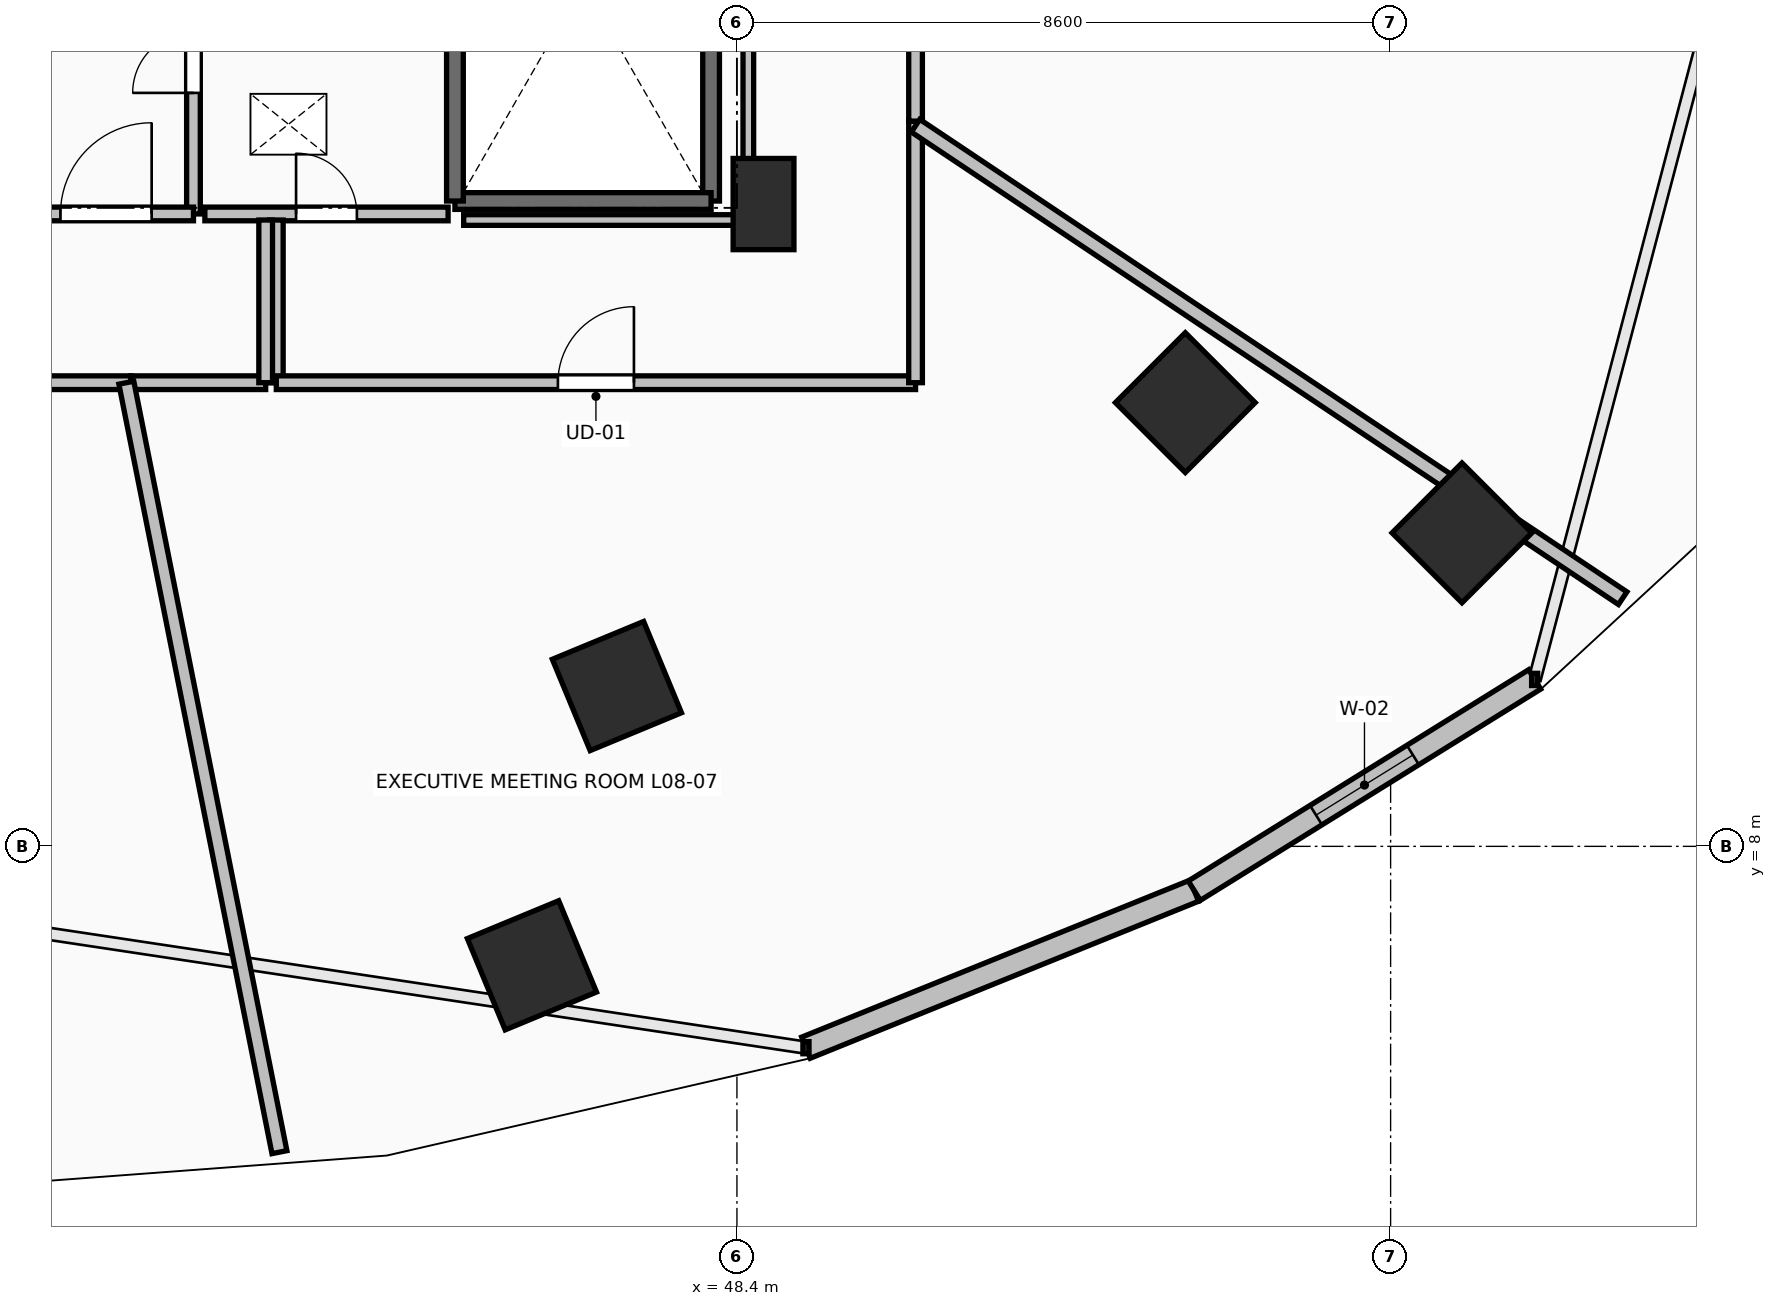
"""IFC4 building model, lengths in metres.
Left out: names, types, materials, properties, quantities, classifications, styles, units other than length and angle.
Written with IfcOpenShell. Run it as: python <this file> out.ifc"""

import sys

from ifc_helpers import new_model, si_unit, direction, frame, frame_2d, origin, origin_2d, place, context, subcontext, project, spatial, rectangle, extrude, element, fill, save


model = new_model("IFC4")
c1 = context("Model", 3, precision=1e-05, world=origin(), true_north=direction((0.0, 1.0)))
c2 = subcontext(c1, "Body", "Model", "MODEL_VIEW")
j1 = project(units=[si_unit("LENGTHUNIT", "METRE"), si_unit("PLANEANGLEUNIT", "RADIAN")], contexts=[c1])
p1 = place(None, origin())
s1 = spatial("IfcSite", under=j1, at=p1, CompositionType="ELEMENT")
p2 = place(p1, origin())
s2 = spatial("IfcBuilding", under=s1, at=p2, CompositionType="ELEMENT")
p3 = place(p2, frame((0.0, 0.0, 34.5)))
s3 = spatial("IfcBuildingStorey", under=s2, at=p3, CompositionType="ELEMENT", Elevation=34.5)
for number, where, z_axis, x_axis in (
    (1, (46.821, 10.109, 0.0), (0.0, 0.0, 1.0), (0.383, -0.924, 0.0)),
    (2, (54.299, 13.838, 0.0), (0.0, 0.0, 1.0), (0.707, -0.707, 0.0)),
    (3, (45.703, 6.435, 0.0), (0.0, 0.0, 1.0), (0.383, -0.924, 0.0)),
    (4, (57.939, 12.124, 0.0), (0.0, 0.0, 1.0), (0.707, -0.707, 0.0)),
):
    element("IfcColumn", number, at=place(p3, frame(where, z_axis=z_axis, x_axis=x_axis)), inside=s3, PredefinedType="COLUMN", context=c2, shape_type="SweptSolid", body=[
        extrude(rectangle(XDim=1.3, YDim=1.3, at=origin_2d()), origin(), (0.0, 0.0, 1.0), 3.5),
    ])
p4 = place(p3, frame((48.75, 16.45, 0.0), z_axis=(0.0, 0.0, 1.0), x_axis=(1.0, 0.0, 0.0)))
e5 = element("IfcColumn", 5, at=p4, inside=s3, PredefinedType="PILASTER", context=c2, shape_type="SweptSolid", body=[
    extrude(rectangle(XDim=0.8, YDim=1.2, at=origin_2d()), origin(), (0.0, 0.0, 1.0), 3.5),
])
p5 = place(p3, frame((49.308, 5.351, 0.0), z_axis=(0.0, 0.0, 1.0), x_axis=(0.927095325176, 0.374825636845, 0.0)))
e6 = element("IfcWall", 6, at=p5, inside=s3, PredefinedType="STANDARD", context=c2, shape_type="SweptSolid", body=[
    extrude(rectangle(XDim=5.51, YDim=0.3, at=frame_2d((2.755, 0.0))), origin(), (0.0, 0.0, 1.0), 3.24),
])
p6 = place(p3, frame((54.417, 7.417, 0.0), z_axis=(0.0, 0.0, 1.0), x_axis=(0.849633724826, 0.527373239404, 0.0)))
e7 = element("IfcWall", 7, at=p6, inside=s3, PredefinedType="STANDARD", context=c2, shape_type="SweptSolid", body=[
    extrude(rectangle(XDim=5.271, YDim=0.3, at=frame_2d((2.635, 0.0))), origin(), (0.0, 0.0, 1.0), 3.24),
])
p7 = place(p6, frame((1.885, 0.0, 0.85)))
e8 = element("IfcOpeningElement", 8, at=p7, cuts=e7, PredefinedType="OPENING", context=c2, shape_type="SweptSolid", body=[
    extrude(rectangle(XDim=1.5, YDim=2.19, at=frame_2d((0.75, 1.095))), frame((0.0, 0.165, 0.0), z_axis=(0.0, -1.0, 0.0), x_axis=(1.0, 0.0, 0.0)), (0.0, 0.0, 1.0), 0.33),
])
p8 = place(p3, frame((48.06, 23.91, 0.0), z_axis=(0.0, 0.0, 1.0), x_axis=(0.0, -1.0, 0.0)))
e9 = element("IfcWall", 9, at=p8, inside=s3, PredefinedType="SOLIDWALL", context=c2, shape_type="SweptSolid", body=[
    extrude(rectangle(XDim=7.42, YDim=0.22, at=frame_2d((3.71, 0.0))), origin(), (0.0, 0.0, 1.0), 3.24),
])
p9 = place(p3, frame((48.06, 16.49, 0.0), z_axis=(0.0, 0.0, 1.0), x_axis=(-1.0, 0.0, 0.0)))
e10 = element("IfcWall", 10, at=p9, inside=s3, PredefinedType="SOLIDWALL", context=c2, shape_type="SweptSolid", body=[
    extrude(rectangle(XDim=3.37, YDim=0.22, at=frame_2d((1.685, 0.0))), origin(), (0.0, 0.0, 1.0), 3.24),
])
p10 = place(p3, frame((44.69, 16.49, 0.0), z_axis=(0.0, 0.0, 1.0), x_axis=(0.0, 1.0, 0.0)))
e11 = element("IfcWall", 11, at=p10, inside=s3, PredefinedType="SOLIDWALL", context=c2, shape_type="SweptSolid", body=[
    extrude(rectangle(XDim=7.42, YDim=0.22, at=frame_2d((3.71, 0.0))), origin(), (0.0, 0.0, 1.0), 3.24),
])
p11 = place(p3, frame((41.25, 16.32, 0.0), z_axis=(0.0, 0.0, 1.0), x_axis=(0.0, 1.0, 0.0)))
e12 = element("IfcWall", 12, at=p11, inside=s3, PredefinedType="PARTITIONING", context=c2, shape_type="SweptSolid", body=[
    extrude(rectangle(XDim=3.985, YDim=0.18, at=frame_2d((1.992, 0.0))), origin(), (0.0, 0.0, 1.0), 3.24),
])
p12 = place(p11, frame((1.593, 0.0, 0.0)))
e13 = element("IfcOpeningElement", 13, at=p12, cuts=e12, PredefinedType="OPENING", context=c2, shape_type="SweptSolid", body=[
    extrude(rectangle(XDim=0.8, YDim=2.05, at=frame_2d((0.4, 1.025))), frame((0.0, 0.105, 0.0), z_axis=(0.0, -1.0, 0.0), x_axis=(1.0, 0.0, 0.0)), (0.0, 0.0, 1.0), 0.21),
])
p13 = place(p3, frame((38.95, 16.32, 0.0), z_axis=(0.0, 0.0, 1.0), x_axis=(1.0, 0.0, 0.0)))
e14 = element("IfcWall", 14, at=p13, inside=s3, PredefinedType="PARTITIONING", context=c2, shape_type="SweptSolid", body=[
    extrude(rectangle(XDim=2.3, YDim=0.18, at=frame_2d((1.15, 0.0))), origin(), (0.0, 0.0, 1.0), 3.24),
])
p14 = place(p13, frame((0.55, 0.0, 0.0)))
e15 = element("IfcOpeningElement", 15, at=p14, cuts=e14, PredefinedType="OPENING", context=c2, shape_type="SweptSolid", body=[
    extrude(rectangle(XDim=1.2, YDim=2.15, at=frame_2d((0.6, 1.075))), frame((0.0, 0.105, 0.0), z_axis=(0.0, -1.0, 0.0), x_axis=(1.0, 0.0, 0.0)), (0.0, 0.0, 1.0), 0.21),
])
p15 = place(p3, frame((41.4, 16.32, 0.0), z_axis=(0.0, 0.0, 1.0), x_axis=(1.0, 0.0, 0.0)))
e16 = element("IfcWall", 16, at=p15, inside=s3, PredefinedType="PARTITIONING", context=c2, shape_type="SweptSolid", body=[
    extrude(rectangle(XDim=3.2, YDim=0.18, at=frame_2d((1.6, 0.0))), origin(), (0.0, 0.0, 1.0), 3.24),
])
p16 = place(p15, frame((1.2, 0.0, 0.0)))
e17 = element("IfcOpeningElement", 17, at=p16, cuts=e16, PredefinedType="OPENING", context=c2, shape_type="SweptSolid", body=[
    extrude(rectangle(XDim=0.8, YDim=2.05, at=frame_2d((0.4, 1.025))), frame((0.0, 0.105, 0.0), z_axis=(0.0, -1.0, 0.0), x_axis=(1.0, 0.0, 0.0)), (0.0, 0.0, 1.0), 0.21),
])
p17 = place(p3, frame((30.109, 14.1, 0.0), z_axis=(0.0, 0.0, 1.0), x_axis=(1.0, 0.0, 0.0)))
e18 = element("IfcWall", 18, at=p17, inside=s3, PredefinedType="PARTITIONING", context=c2, shape_type="SweptSolid", body=[
    extrude(rectangle(XDim=10.319, YDim=0.18, at=frame_2d((5.16, 0.0))), origin(), (0.0, 0.0, 1.0), 3.24),
])
p18 = place(p17, frame((4.659, 0.0, 0.0)))
e19 = element("IfcOpeningElement", 19, at=p18, cuts=e18, PredefinedType="OPENING", context=c2, shape_type="SweptSolid", body=[
    extrude(rectangle(XDim=1.0, YDim=2.15, at=frame_2d((0.5, 1.075))), frame((0.0, 0.105, 0.0), z_axis=(0.0, -1.0, 0.0), x_axis=(1.0, 0.0, 0.0)), (0.0, 0.0, 1.0), 0.21),
])
p19 = place(p3, frame((42.34, 16.24, 0.0), z_axis=(0.0, 0.0, 1.0), x_axis=(0.0, -1.0, 0.0)))
e20 = element("IfcWall", 20, at=p19, inside=s3, PredefinedType="PARTITIONING", context=c2, shape_type="SweptSolid", body=[
    extrude(rectangle(XDim=2.14, YDim=0.18, at=frame_2d((1.07, 0.0))), origin(), (0.0, 0.0, 1.0), 3.24),
])
p20 = place(p3, frame((42.34, 14.1, 0.0), z_axis=(0.0, 0.0, 1.0), x_axis=(1.0, 0.0, 0.0)))
e21 = element("IfcWall", 21, at=p20, inside=s3, PredefinedType="PARTITIONING", context=c2, shape_type="SweptSolid", body=[
    extrude(rectangle(XDim=8.41, YDim=0.18, at=frame_2d((4.205, 0.0))), origin(), (0.0, 0.0, 1.0), 2.432),
])
p21 = place(p20, frame((3.705, 0.0, 0.0)))
e22 = element("IfcOpeningElement", 22, at=p21, cuts=e21, PredefinedType="OPENING", context=c2, shape_type="SweptSolid", body=[
    extrude(rectangle(XDim=1.0, YDim=2.15, at=frame_2d((0.5, 1.075))), frame((0.0, 0.105, 0.0), z_axis=(0.0, -1.0, 0.0), x_axis=(1.0, 0.0, 0.0)), (0.0, 0.0, 1.0), 0.21),
])
p22 = place(p3, frame((50.75, 14.1, 0.0), z_axis=(0.0, 0.0, 1.0), x_axis=(0.0, 1.0, 0.0)))
e23 = element("IfcWall", 23, at=p22, inside=s3, PredefinedType="PARTITIONING", context=c2, shape_type="SweptSolid", body=[
    extrude(rectangle(XDim=3.441, YDim=0.18, at=frame_2d((1.72, 0.0))), origin(), (0.0, 0.0, 1.0), 2.432),
])
p23 = place(p3, frame((40.428, 14.1, 0.0), z_axis=(0.0, 0.0, 1.0), x_axis=(1.0, 0.0, 0.0)))
e24 = element("IfcWall", 24, at=p23, inside=s3, PredefinedType="PARTITIONING", context=c2, shape_type="SweptSolid", body=[
    extrude(rectangle(XDim=1.772, YDim=0.18, at=frame_2d((0.886, 0.0))), origin(), (0.0, 0.0, 1.0), 3.24),
])
p24 = place(p3, frame((42.2, 14.1, 0.0), z_axis=(0.0, 0.0, 1.0), x_axis=(0.0, 1.0, 0.0)))
e25 = element("IfcWall", 25, at=p24, inside=s3, PredefinedType="PARTITIONING", context=c2, shape_type="SweptSolid", body=[
    extrude(rectangle(XDim=2.14, YDim=0.18, at=frame_2d((1.07, 0.0))), origin(), (0.0, 0.0, 1.0), 3.24),
])
p25 = place(p3, frame((50.75, 17.541, 0.0), z_axis=(0.0, 0.0, 1.0), x_axis=(0.0, 1.0, 0.0)))
e26 = element("IfcWall", 26, at=p25, inside=s3, PredefinedType="PARTITIONING", context=c2, shape_type="SweptSolid", body=[
    extrude(rectangle(XDim=10.795, YDim=0.18, at=frame_2d((5.397, 0.0))), origin(), (0.0, 0.0, 1.0), 2.432),
])
p26 = place(p25, frame((4.897, 0.0, 0.0)))
e27 = element("IfcOpeningElement", 27, at=p26, cuts=e26, PredefinedType="OPENING", context=c2, shape_type="SweptSolid", body=[
    extrude(rectangle(XDim=1.0, YDim=2.15, at=frame_2d((0.5, 1.075))), frame((0.0, 0.105, 0.0), z_axis=(0.0, -1.0, 0.0), x_axis=(1.0, 0.0, 0.0)), (0.0, 0.0, 1.0), 0.21),
])
p27 = place(p3, frame((42.381, 3.977, 0.0), z_axis=(0.0, 0.0, 1.0), x_axis=(-0.195142599893, 0.980774880239, 0.0)))
e28 = element("IfcWall", 28, at=p27, inside=s3, PredefinedType="PARTITIONING", context=c2, shape_type="SweptSolid", body=[
    extrude(rectangle(XDim=10.322, YDim=0.2, at=frame_2d((5.161, 0.0))), origin(), (0.0, 0.0, 1.0), 2.432),
])
p28 = place(p3, frame((60.053, 11.265, 0.0), z_axis=(0.0, 0.0, 1.0), x_axis=(-0.831469078055, 0.555571032577, 0.0)))
e29 = element("IfcWall", 29, at=p28, inside=s3, PredefinedType="PARTITIONING", context=c2, shape_type="SweptSolid", body=[
    extrude(rectangle(XDim=11.189, YDim=0.2, at=frame_2d((5.594, 0.0))), origin(), (0.0, 0.0, 1.0), 2.624),
])
p29 = place(p3, frame((48.55, 23.754, 0.0), z_axis=(0.0, 0.0, 1.0), x_axis=(0.0, -1.0, 0.0)))
e30 = element("IfcWall", 30, at=p29, inside=s3, PredefinedType="PARTITIONING", context=c2, shape_type="SweptSolid", body=[
    extrude(rectangle(XDim=7.514, YDim=0.14, at=frame_2d((3.757, 0.0))), origin(), (0.0, 0.0, 1.0), 2.432),
])
p30 = place(p3, frame((48.55, 16.24, 0.0), z_axis=(0.0, 0.0, 1.0), x_axis=(-1.0, 0.0, 0.0)))
e31 = element("IfcWall", 31, at=p30, inside=s3, PredefinedType="PARTITIONING", context=c2, shape_type="SweptSolid", body=[
    extrude(rectangle(XDim=3.745, YDim=0.14, at=frame_2d((1.873, 0.0))), origin(), (0.0, 0.0, 1.0), 2.432),
])
p31 = place(p7, origin())
e32 = element("IfcWindow", 32, at=p31, inside=s3, PartitioningType="SINGLE_PANEL", PredefinedType="WINDOW", context=c2, shape_type="SweptSolid", body=[
    extrude(rectangle(XDim=1.5, YDim=2.19, at=frame_2d((0.75, 1.095))), frame((0.0, 0.03, 0.0), z_axis=(0.0, -1.0, 0.0), x_axis=(1.0, 0.0, 0.0)), (0.0, 0.0, 1.0), 0.06),
])
fill(e8, e32)
p32 = place(p12, origin())
e33 = element("IfcDoor", 33, at=p32, inside=s3, OperationType="SINGLE_SWING_LEFT", PredefinedType="DOOR", context=c2, shape_type="SweptSolid", body=[
    extrude(rectangle(XDim=0.8, YDim=2.05, at=frame_2d((0.4, 1.025))), frame((0.0, 0.025, 0.0), z_axis=(0.0, -1.0, 0.0), x_axis=(1.0, 0.0, 0.0)), (0.0, 0.0, 1.0), 0.05),
])
fill(e13, e33)
p33 = place(p14, origin())
e34 = element("IfcDoor", 34, at=p33, inside=s3, OperationType="SINGLE_SWING_RIGHT", PredefinedType="DOOR", context=c2, shape_type="SweptSolid", body=[
    extrude(rectangle(XDim=1.2, YDim=2.15, at=frame_2d((0.6, 1.075))), frame((0.0, 0.025, 0.0), z_axis=(0.0, -1.0, 0.0), x_axis=(1.0, 0.0, 0.0)), (0.0, 0.0, 1.0), 0.05),
])
fill(e15, e34)
p34 = place(p16, origin())
e35 = element("IfcDoor", 35, at=p34, inside=s3, OperationType="SINGLE_SWING_LEFT", PredefinedType="DOOR", context=c2, shape_type="SweptSolid", body=[
    extrude(rectangle(XDim=0.8, YDim=2.05, at=frame_2d((0.4, 1.025))), frame((0.0, 0.025, 0.0), z_axis=(0.0, -1.0, 0.0), x_axis=(1.0, 0.0, 0.0)), (0.0, 0.0, 1.0), 0.05),
])
fill(e17, e35)
p35 = place(p21, origin())
e36 = element("IfcDoor", 36, at=p35, inside=s3, OperationType="SINGLE_SWING_RIGHT", PredefinedType="DOOR", context=c2, shape_type="SweptSolid", body=[
    extrude(rectangle(XDim=1.0, YDim=2.15, at=frame_2d((0.5, 1.075))), frame((0.0, 0.025, 0.0), z_axis=(0.0, -1.0, 0.0), x_axis=(1.0, 0.0, 0.0)), (0.0, 0.0, 1.0), 0.05),
])
fill(e22, e36)
save(model, sys.argv[1])
